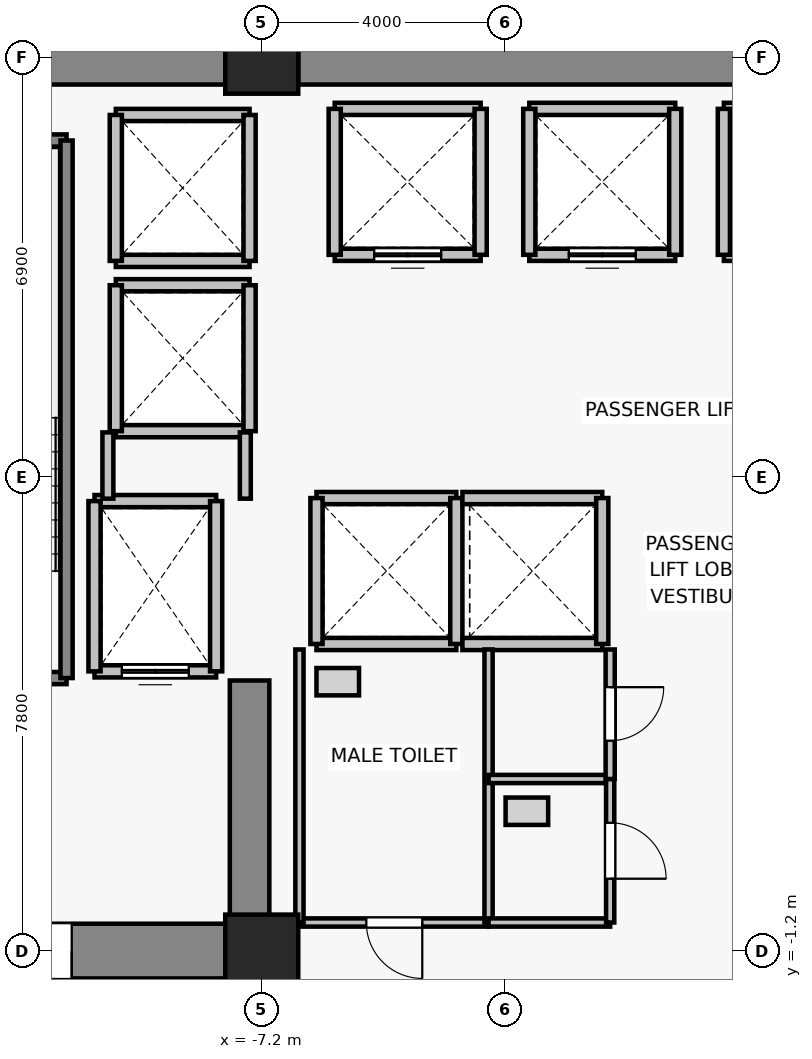
"""IFC4 building model, lengths in metres.
Left out: names, types, materials, properties, quantities, classifications, styles, units other than length and angle.
Written with IfcOpenShell. Run it as: python <this file> out.ifc"""

import sys

from ifc_helpers import new_model, si_unit, direction, frame, frame_2d, origin, origin_2d, place, context, subcontext, project, spatial, rectangle, extrude, source, transform, mapped, element, fill, save


model = new_model("IFC4")
c1 = context("Model", 3, precision=1e-05, world=origin(), true_north=direction((0.0, 1.0)))
c2 = subcontext(c1, "Body", "Model", "MODEL_VIEW")
j1 = project(units=[si_unit("LENGTHUNIT", "METRE"), si_unit("PLANEANGLEUNIT", "RADIAN")], contexts=[c1])
p1 = place(None, origin())
s1 = spatial("IfcSite", under=j1, at=p1, CompositionType="ELEMENT")
p2 = place(p1, origin())
s2 = spatial("IfcBuilding", under=s1, at=p2, CompositionType="ELEMENT")
p3 = place(p2, frame((0.0, 0.0, 43.9)))
s3 = spatial("IfcBuildingStorey", under=s2, at=p3, CompositionType="ELEMENT", Elevation=43.9)
for number, where, z_axis, x_axis in (
    (1, (-7.2, -1.2, 0.0), (0.0, 0.0, 1.0), (1.0, 0.0, 0.0)),
    (2, (-7.2, 13.5, 0.0), (0.0, 0.0, 1.0), (1.0, 0.0, 0.0)),
):
    element("IfcColumn", number, at=place(p3, frame(where, z_axis=z_axis, x_axis=x_axis)), inside=s3, PredefinedType="COLUMN", context=c2, shape_type="SweptSolid", body=[
        extrude(rectangle(XDim=1.2, YDim=1.2, at=origin_2d()), origin(), (0.0, 0.0, 1.0), 3.3),
    ])
p4 = place(p3, frame((-13.8, 13.5, 0.0), z_axis=(0.0, 0.0, 1.0), x_axis=(1.0, 0.0, 0.0)))
e3 = element("IfcWall", 3, at=p4, inside=s3, PredefinedType="SHEAR", context=c2, shape_type="SweptSolid", body=[
    extrude(rectangle(XDim=6.0, YDim=0.9, at=frame_2d((3.0, 0.0))), origin(), (0.0, 0.0, 1.0), 3.075),
])
p5 = place(p3, frame((-6.6, 13.5, 0.0), z_axis=(0.0, 0.0, 1.0), x_axis=(1.0, 0.0, 0.0)))
e4 = element("IfcWall", 4, at=p5, inside=s3, PredefinedType="SHEAR", context=c2, shape_type="SweptSolid", body=[
    extrude(rectangle(XDim=13.2, YDim=0.9, at=frame_2d((6.6, 0.0))), origin(), (0.0, 0.0, 1.0), 3.075),
])
p6 = place(p3, frame((-7.8, -1.2, 0.0), z_axis=(0.0, 0.0, 1.0), x_axis=(-1.0, 0.0, 0.0)))
e5 = element("IfcWall", 5, at=p6, inside=s3, PredefinedType="SHEAR", context=c2, shape_type="SweptSolid", body=[
    extrude(rectangle(XDim=6.0, YDim=0.9, at=frame_2d((3.0, 0.0))), origin(), (0.0, 0.0, 1.0), 3.075),
])
p7 = place(p6, frame((2.525, 0.0, 0.0)))
e6 = element("IfcOpeningElement", 6, at=p7, cuts=e5, PredefinedType="OPENING", context=c2, shape_type="SweptSolid", body=[
    extrude(rectangle(XDim=1.15, YDim=2.15, at=frame_2d((0.575, 1.075))), frame((0.0, 0.46, 0.0), z_axis=(0.0, -1.0, 0.0), x_axis=(1.0, 0.0, 0.0)), (0.0, 0.0, 1.0), 0.92),
])
p8 = place(p3, frame((-7.4, -0.75, 0.0), z_axis=(0.0, 0.0, 1.0), x_axis=(0.0, 1.0, 0.0)))
e7 = element("IfcWall", 7, at=p8, inside=s3, PredefinedType="SHEAR", context=c2, shape_type="SweptSolid", body=[
    extrude(rectangle(XDim=4.0, YDim=0.65, at=frame_2d((2.0, 0.0))), origin(), (0.0, 0.0, 1.0), 3.075),
])
p9 = place(p3, frame((-7.95, 3.4, 0.0), z_axis=(0.0, 0.0, 1.0), x_axis=(-1.0, 0.0, 0.0)))
e8 = element("IfcWall", 8, at=p9, inside=s3, PredefinedType="SOLIDWALL", context=c2, shape_type="SweptSolid", body=[
    extrude(rectangle(XDim=2.0, YDim=0.2, at=frame_2d((1.0, 0.0))), origin(), (0.0, 0.0, 1.0), 3.075),
])
p10 = place(p9, frame((0.45, 0.0, 0.0)))
e9 = element("IfcOpeningElement", 9, at=p10, cuts=e8, PredefinedType="OPENING", context=c2, shape_type="SweptSolid", body=[
    extrude(rectangle(XDim=1.1, YDim=2.2, at=frame_2d((0.55, 1.1))), frame((0.0, 0.11, 0.0), z_axis=(0.0, -1.0, 0.0), x_axis=(1.0, 0.0, 0.0)), (0.0, 0.0, 1.0), 0.22),
])
p11 = place(p3, frame((-9.95, 6.2, 0.0), z_axis=(0.0, 0.0, 1.0), x_axis=(1.0, 0.0, 0.0)))
e10 = element("IfcWall", 10, at=p11, inside=s3, PredefinedType="SOLIDWALL", context=c2, shape_type="SweptSolid", body=[
    extrude(rectangle(XDim=2.0, YDim=0.2, at=frame_2d((1.0, 0.0))), origin(), (0.0, 0.0, 1.0), 3.075),
])
for number, where, z_axis, x_axis in (
    (11, (-9.95, 3.4, 0.0), (0.0, 0.0, 1.0), (0.0, 1.0, 0.0)),
    (12, (-7.95, 6.2, 0.0), (0.0, 0.0, 1.0), (0.0, -1.0, 0.0)),
):
    element("IfcWall", number, at=place(p3, frame(where, z_axis=z_axis, x_axis=x_axis)), inside=s3, PredefinedType="SOLIDWALL", context=c2, shape_type="SweptSolid", body=[
        extrude(rectangle(XDim=2.8, YDim=0.2, at=frame_2d((1.4, 0.0))), origin(), (0.0, 0.0, 1.0), 3.075),
    ])
p12 = place(p3, frame((-3.6, 10.25, 0.0), z_axis=(0.0, 0.0, 1.0), x_axis=(-1.0, 0.0, 0.0)))
e13 = element("IfcWall", 13, at=p12, inside=s3, PredefinedType="SOLIDWALL", context=c2, shape_type="SweptSolid", body=[
    extrude(rectangle(XDim=2.4, YDim=0.2, at=frame_2d((1.2, 0.0))), origin(), (0.0, 0.0, 1.0), 3.075),
])
p13 = place(p12, frame((0.65, 0.0, 0.0)))
e14 = element("IfcOpeningElement", 14, at=p13, cuts=e13, PredefinedType="OPENING", context=c2, shape_type="SweptSolid", body=[
    extrude(rectangle(XDim=1.1, YDim=2.2, at=frame_2d((0.55, 1.1))), frame((0.0, 0.11, 0.0), z_axis=(0.0, -1.0, 0.0), x_axis=(1.0, 0.0, 0.0)), (0.0, 0.0, 1.0), 0.22),
])
for number, where, z_axis, x_axis in (
    (15, (-6.0, 12.65, 0.0), (0.0, 0.0, 1.0), (1.0, 0.0, 0.0)),
    (16, (-6.0, 10.25, 0.0), (0.0, 0.0, 1.0), (0.0, 1.0, 0.0)),
    (17, (-3.6, 12.65, 0.0), (0.0, 0.0, 1.0), (0.0, -1.0, 0.0)),
):
    element("IfcWall", number, at=place(p3, frame(where, z_axis=z_axis, x_axis=x_axis)), inside=s3, PredefinedType="SOLIDWALL", context=c2, shape_type="SweptSolid", body=[
        extrude(rectangle(XDim=2.4, YDim=0.2, at=frame_2d((1.2, 0.0))), origin(), (0.0, 0.0, 1.0), 3.075),
    ])
p14 = place(p3, frame((-0.4, 10.25, 0.0), z_axis=(0.0, 0.0, 1.0), x_axis=(-1.0, 0.0, 0.0)))
e18 = element("IfcWall", 18, at=p14, inside=s3, PredefinedType="SOLIDWALL", context=c2, shape_type="SweptSolid", body=[
    extrude(rectangle(XDim=2.4, YDim=0.2, at=frame_2d((1.2, 0.0))), origin(), (0.0, 0.0, 1.0), 3.075),
])
p15 = place(p14, frame((0.65, 0.0, 0.0)))
e19 = element("IfcOpeningElement", 19, at=p15, cuts=e18, PredefinedType="OPENING", context=c2, shape_type="SweptSolid", body=[
    extrude(rectangle(XDim=1.1, YDim=2.2, at=frame_2d((0.55, 1.1))), frame((0.0, 0.11, 0.0), z_axis=(0.0, -1.0, 0.0), x_axis=(1.0, 0.0, 0.0)), (0.0, 0.0, 1.0), 0.22),
])
p16 = place(p3, frame((-2.8, 12.65, 0.0), z_axis=(0.0, 0.0, 1.0), x_axis=(1.0, 0.0, 0.0)))
e20 = element("IfcWall", 20, at=p16, inside=s3, PredefinedType="SOLIDWALL", context=c2, shape_type="SweptSolid", body=[
    extrude(rectangle(XDim=2.4, YDim=0.2, at=frame_2d((1.2, 0.0))), origin(), (0.0, 0.0, 1.0), 3.075),
])
for number, where, z_axis, x_axis in (
    (21, (-2.8, 10.25, 0.0), (0.0, 0.0, 1.0), (0.0, 1.0, 0.0)),
    (22, (-0.4, 12.65, 0.0), (0.0, 0.0, 1.0), (0.0, -1.0, 0.0)),
):
    element("IfcWall", number, at=place(p3, frame(where, z_axis=z_axis, x_axis=x_axis)), inside=s3, PredefinedType="SOLIDWALL", context=c2, shape_type="SweptSolid", body=[
        extrude(rectangle(XDim=2.4, YDim=0.2, at=frame_2d((1.2, 0.0))), origin(), (0.0, 0.0, 1.0), 3.075),
    ])
p17 = place(p3, frame((2.8, 10.25, 0.0), z_axis=(0.0, 0.0, 1.0), x_axis=(-1.0, 0.0, 0.0)))
e23 = element("IfcWall", 23, at=p17, inside=s3, PredefinedType="SOLIDWALL", context=c2, shape_type="SweptSolid", body=[
    extrude(rectangle(XDim=2.4, YDim=0.2, at=frame_2d((1.2, 0.0))), origin(), (0.0, 0.0, 1.0), 3.075),
])
p18 = place(p17, frame((0.65, 0.0, 0.0)))
e24 = element("IfcOpeningElement", 24, at=p18, cuts=e23, PredefinedType="OPENING", context=c2, shape_type="SweptSolid", body=[
    extrude(rectangle(XDim=1.1, YDim=2.2, at=frame_2d((0.55, 1.1))), frame((0.0, 0.11, 0.0), z_axis=(0.0, -1.0, 0.0), x_axis=(1.0, 0.0, 0.0)), (0.0, 0.0, 1.0), 0.22),
])
p19 = place(p3, frame((0.4, 12.65, 0.0), z_axis=(0.0, 0.0, 1.0), x_axis=(1.0, 0.0, 0.0)))
e25 = element("IfcWall", 25, at=p19, inside=s3, PredefinedType="SOLIDWALL", context=c2, shape_type="SweptSolid", body=[
    extrude(rectangle(XDim=2.4, YDim=0.2, at=frame_2d((1.2, 0.0))), origin(), (0.0, 0.0, 1.0), 3.075),
])
p20 = place(p3, frame((0.4, 10.25, 0.0), z_axis=(0.0, 0.0, 1.0), x_axis=(0.0, 1.0, 0.0)))
e26 = element("IfcWall", 26, at=p20, inside=s3, PredefinedType="SOLIDWALL", context=c2, shape_type="SweptSolid", body=[
    extrude(rectangle(XDim=2.4, YDim=0.2, at=frame_2d((1.2, 0.0))), origin(), (0.0, 0.0, 1.0), 3.075),
])
for number, where, z_axis, x_axis in (
    (27, (-4.0, 3.85, 0.0), (0.0, 0.0, 1.0), (-1.0, 0.0, 0.0)),
    (28, (-6.3, 6.25, 0.0), (0.0, 0.0, 1.0), (1.0, 0.0, 0.0)),
):
    element("IfcWall", number, at=place(p3, frame(where, z_axis=z_axis, x_axis=x_axis)), inside=s3, PredefinedType="SOLIDWALL", context=c2, shape_type="SweptSolid", body=[
        extrude(rectangle(XDim=2.3, YDim=0.2, at=frame_2d((1.15, 0.0))), origin(), (0.0, 0.0, 1.0), 3.075),
    ])
for number, where, z_axis, x_axis in (
    (29, (-6.3, 3.85, 0.0), (0.0, 0.0, 1.0), (0.0, 1.0, 0.0)),
    (30, (-4.0, 6.25, 0.0), (0.0, 0.0, 1.0), (0.0, -1.0, 0.0)),
):
    element("IfcWall", number, at=place(p3, frame(where, z_axis=z_axis, x_axis=x_axis)), inside=s3, PredefinedType="SOLIDWALL", context=c2, shape_type="SweptSolid", body=[
        extrude(rectangle(XDim=2.4, YDim=0.2, at=frame_2d((1.2, 0.0))), origin(), (0.0, 0.0, 1.0), 3.075),
    ])
for number, where, z_axis, x_axis in (
    (31, (-1.6, 3.85, 0.0), (0.0, 0.0, 1.0), (-1.0, 0.0, 0.0)),
    (32, (-3.9, 6.25, 0.0), (0.0, 0.0, 1.0), (1.0, 0.0, 0.0)),
):
    element("IfcWall", number, at=place(p3, frame(where, z_axis=z_axis, x_axis=x_axis)), inside=s3, PredefinedType="SOLIDWALL", context=c2, shape_type="SweptSolid", body=[
        extrude(rectangle(XDim=2.3, YDim=0.2, at=frame_2d((1.15, 0.0))), origin(), (0.0, 0.0, 1.0), 3.075),
    ])
p21 = place(p3, frame((-1.6, 6.25, 0.0), z_axis=(0.0, 0.0, 1.0), x_axis=(0.0, -1.0, 0.0)))
e33 = element("IfcWall", 33, at=p21, inside=s3, PredefinedType="SOLIDWALL", context=c2, shape_type="SweptSolid", body=[
    extrude(rectangle(XDim=2.4, YDim=0.2, at=frame_2d((1.2, 0.0))), origin(), (0.0, 0.0, 1.0), 3.075),
])
for number, where, z_axis, x_axis in (
    (34, (-7.4, 7.35, 0.0), (0.0, 0.0, 1.0), (-1.0, 0.0, 0.0)),
    (35, (-9.6, 9.75, 0.0), (0.0, 0.0, 1.0), (1.0, 0.0, 0.0)),
):
    element("IfcWall", number, at=place(p3, frame(where, z_axis=z_axis, x_axis=x_axis)), inside=s3, PredefinedType="SOLIDWALL", context=c2, shape_type="SweptSolid", body=[
        extrude(rectangle(XDim=2.2, YDim=0.2, at=frame_2d((1.1, 0.0))), origin(), (0.0, 0.0, 1.0), 2.465),
    ])
p22 = place(p3, frame((-9.6, 7.35, 0.0), z_axis=(0.0, 0.0, 1.0), x_axis=(0.0, 1.0, 0.0)))
e36 = element("IfcWall", 36, at=p22, inside=s3, PredefinedType="SOLIDWALL", context=c2, shape_type="SweptSolid", body=[
    extrude(rectangle(XDim=2.4, YDim=0.2, at=frame_2d((1.2, 0.0))), origin(), (0.0, 0.0, 1.0), 3.075),
])
p23 = place(p3, frame((-7.4, 9.75, 0.0), z_axis=(0.0, 0.0, 1.0), x_axis=(0.0, -1.0, 0.0)))
e37 = element("IfcWall", 37, at=p23, inside=s3, PredefinedType="SOLIDWALL", context=c2, shape_type="SweptSolid", body=[
    extrude(rectangle(XDim=2.4, YDim=0.2, at=frame_2d((1.2, 0.0))), origin(), (0.0, 0.0, 1.0), 2.465),
])
for number, where, z_axis, x_axis in (
    (38, (-7.4, 10.15, 0.0), (0.0, 0.0, 1.0), (-1.0, 0.0, 0.0)),
    (39, (-9.6, 12.55, 0.0), (0.0, 0.0, 1.0), (1.0, 0.0, 0.0)),
):
    element("IfcWall", number, at=place(p3, frame(where, z_axis=z_axis, x_axis=x_axis)), inside=s3, PredefinedType="SOLIDWALL", context=c2, shape_type="SweptSolid", body=[
        extrude(rectangle(XDim=2.2, YDim=0.2, at=frame_2d((1.1, 0.0))), origin(), (0.0, 0.0, 1.0), 2.465),
    ])
p24 = place(p3, frame((-9.6, 10.15, 0.0), z_axis=(0.0, 0.0, 1.0), x_axis=(0.0, 1.0, 0.0)))
e40 = element("IfcWall", 40, at=p24, inside=s3, PredefinedType="SOLIDWALL", context=c2, shape_type="SweptSolid", body=[
    extrude(rectangle(XDim=2.4, YDim=0.2, at=frame_2d((1.2, 0.0))), origin(), (0.0, 0.0, 1.0), 3.075),
])
p25 = place(p3, frame((-7.4, 12.55, 0.0), z_axis=(0.0, 0.0, 1.0), x_axis=(0.0, -1.0, 0.0)))
e41 = element("IfcWall", 41, at=p25, inside=s3, PredefinedType="SOLIDWALL", context=c2, shape_type="SweptSolid", body=[
    extrude(rectangle(XDim=2.4, YDim=0.2, at=frame_2d((1.2, 0.0))), origin(), (0.0, 0.0, 1.0), 2.465),
])
p26 = place(p3, frame((-10.41, 3.29, 0.0), z_axis=(0.0, 0.0, 1.0), x_axis=(-1.0, 0.0, 0.0)))
e42 = element("IfcWall", 42, at=p26, inside=s3, PredefinedType="SOLIDWALL", context=c2, shape_type="SweptSolid", body=[
    extrude(rectangle(XDim=3.52, YDim=0.2, at=frame_2d((1.76, 0.0))), origin(), (0.0, 0.0, 1.0), 3.075),
])
p27 = place(p26, frame((1.165, 0.0, 0.0)))
e43 = element("IfcOpeningElement", 43, at=p27, cuts=e42, PredefinedType="OPENING", context=c2, shape_type="SweptSolid", body=[
    extrude(rectangle(XDim=1.15, YDim=2.15, at=frame_2d((0.575, 1.075))), frame((0.0, 0.11, 0.0), z_axis=(0.0, -1.0, 0.0), x_axis=(1.0, 0.0, 0.0)), (0.0, 0.0, 1.0), 0.22),
])
p28 = place(p3, frame((-13.93, 12.13, 0.0), z_axis=(0.0, 0.0, 1.0), x_axis=(1.0, 0.0, 0.0)))
e44 = element("IfcWall", 44, at=p28, inside=s3, PredefinedType="SOLIDWALL", context=c2, shape_type="SweptSolid", body=[
    extrude(rectangle(XDim=3.52, YDim=0.2, at=frame_2d((1.76, 0.0))), origin(), (0.0, 0.0, 1.0), 3.075),
])
p29 = place(p3, frame((-10.41, 12.13, 0.0), z_axis=(0.0, 0.0, 1.0), x_axis=(0.0, -1.0, 0.0)))
e45 = element("IfcWall", 45, at=p29, inside=s3, PredefinedType="SOLIDWALL", context=c2, shape_type="SweptSolid", body=[
    extrude(rectangle(XDim=8.84, YDim=0.2, at=frame_2d((4.42, 0.0))), origin(), (0.0, 0.0, 1.0), 3.075),
])
p30 = place(p3, frame((-9.73, 6.24, 0.0), z_axis=(0.0, 0.0, 1.0), x_axis=(0.0, 1.0, 0.0)))
e46 = element("IfcWall", 46, at=p30, inside=s3, PredefinedType="PARTITIONING", context=c2, shape_type="SweptSolid", body=[
    extrude(rectangle(XDim=1.09, YDim=0.18, at=frame_2d((0.545, 0.0))), origin(), (0.0, 0.0, 1.0), 3.075),
])
p31 = place(p3, frame((-7.47, 7.33, 0.0), z_axis=(0.0, 0.0, 1.0), x_axis=(0.0, -1.0, 0.0)))
e47 = element("IfcWall", 47, at=p31, inside=s3, PredefinedType="PARTITIONING", context=c2, shape_type="SweptSolid", body=[
    extrude(rectangle(XDim=1.09, YDim=0.18, at=frame_2d((0.545, 0.0))), origin(), (0.0, 0.0, 1.0), 2.465),
])
p32 = place(p3, frame((-3.47, -0.73, 0.0), z_axis=(0.0, 0.0, 1.0), x_axis=(-1.0, 0.0, 0.0)))
e48 = element("IfcWall", 48, at=p32, inside=s3, PredefinedType="PARTITIONING", context=c2, shape_type="SweptSolid", body=[
    extrude(rectangle(XDim=3.11, YDim=0.135, at=frame_2d((1.555, 0.0))), origin(), (0.0, 0.0, 1.0), 3.075),
])
p33 = place(p32, frame((1.09, 0.0, 0.0)))
e49 = element("IfcOpeningElement", 49, at=p33, cuts=e48, PredefinedType="OPENING", context=c2, shape_type="SweptSolid", body=[
    extrude(rectangle(XDim=0.92, YDim=2.1, at=frame_2d((0.46, 1.05))), frame((0.0, 0.077, 0.0), z_axis=(0.0, -1.0, 0.0), x_axis=(1.0, 0.0, 0.0)), (0.0, 0.0, 1.0), 0.155),
])
for number, where, z_axis, x_axis in (
    (50, (-6.58, -0.73, 0.0), (0.0, 0.0, 1.0), (0.0, 1.0, 0.0)),
    (51, (-3.47, 3.76, 0.0), (0.0, 0.0, 1.0), (0.0, -1.0, 0.0)),
):
    element("IfcWall", number, at=place(p3, frame(where, z_axis=z_axis, x_axis=x_axis)), inside=s3, PredefinedType="PARTITIONING", context=c2, shape_type="SweptSolid", body=[
        extrude(rectangle(XDim=4.49, YDim=0.135, at=frame_2d((2.245, 0.0))), origin(), (0.0, 0.0, 1.0), 3.075),
    ])
for number, where, z_axis, x_axis in (
    (52, (-1.47, -0.73, 0.0), (0.0, 0.0, 1.0), (-1.0, 0.0, 0.0)),
    (53, (-3.47, 1.63, 0.0), (0.0, 0.0, 1.0), (1.0, 0.0, 0.0)),
):
    element("IfcWall", number, at=place(p3, frame(where, z_axis=z_axis, x_axis=x_axis)), inside=s3, PredefinedType="PARTITIONING", context=c2, shape_type="SweptSolid", body=[
        extrude(rectangle(XDim=2.0, YDim=0.135, at=frame_2d((1.0, 0.0))), origin(), (0.0, 0.0, 1.0), 3.075),
    ])
p34 = place(p3, frame((-1.47, 1.63, 0.0), z_axis=(0.0, 0.0, 1.0), x_axis=(0.0, -1.0, 0.0)))
e54 = element("IfcWall", 54, at=p34, inside=s3, PredefinedType="PARTITIONING", context=c2, shape_type="SweptSolid", body=[
    extrude(rectangle(XDim=2.36, YDim=0.135, at=frame_2d((1.18, 0.0))), origin(), (0.0, 0.0, 1.0), 3.075),
])
p35 = place(p34, frame((0.72, 0.0, 0.0)))
e55 = element("IfcOpeningElement", 55, at=p35, cuts=e54, PredefinedType="OPENING", context=c2, shape_type="SweptSolid", body=[
    extrude(rectangle(XDim=0.92, YDim=2.1, at=frame_2d((0.46, 1.05))), frame((0.0, 0.077, 0.0), z_axis=(0.0, -1.0, 0.0), x_axis=(1.0, 0.0, 0.0)), (0.0, 0.0, 1.0), 0.155),
])
p36 = place(p3, frame((-1.47, 3.76, 0.0), z_axis=(0.0, 0.0, 1.0), x_axis=(0.0, -1.0, 0.0)))
e56 = element("IfcWall", 56, at=p36, inside=s3, PredefinedType="PARTITIONING", context=c2, shape_type="SweptSolid", body=[
    extrude(rectangle(XDim=2.13, YDim=0.15, at=frame_2d((1.065, 0.0))), origin(), (0.0, 0.0, 1.0), 3.075),
])
p37 = place(p36, frame((0.62, 0.0, 0.0)))
e57 = element("IfcOpeningElement", 57, at=p37, cuts=e56, PredefinedType="OPENING", context=c2, shape_type="SweptSolid", body=[
    extrude(rectangle(XDim=0.88, YDim=2.1, at=frame_2d((0.44, 1.05))), frame((0.0, 0.085, 0.0), z_axis=(0.0, -1.0, 0.0), x_axis=(1.0, 0.0, 0.0)), (0.0, 0.0, 1.0), 0.17),
])
m1 = source(origin(), c2, "Body", "SweptSolid", [
    extrude(rectangle(XDim=1.1, YDim=2.2, at=frame_2d((0.55, 1.1))), frame((0.0, 0.025, 0.0), z_axis=(0.0, -1.0, 0.0), x_axis=(1.0, 0.0, 0.0)), (0.0, 0.0, 1.0), 0.05),
])
p38 = place(p10, origin())
e58 = element("IfcDoor", 58, at=p38, inside=s3, OperationType="DOUBLE_DOOR_SLIDING", PredefinedType="DOOR", context=c2, shape_type="MappedRepresentation", body=[
    mapped(m1, transform((0.0, 0.0, 0.0), x_axis=(1.0, 0.0, 0.0), y_axis=(0.0, 1.0, 0.0), z_axis=(0.0, 0.0, 1.0), scale=1.0)),
])
fill(e9, e58)
p39 = place(p13, origin())
e59 = element("IfcDoor", 59, at=p39, inside=s3, OperationType="DOUBLE_DOOR_SLIDING", PredefinedType="DOOR", context=c2, shape_type="MappedRepresentation", body=[
    mapped(m1, transform((0.0, 0.0, 0.0), x_axis=(1.0, 0.0, 0.0), y_axis=(0.0, 1.0, 0.0), z_axis=(0.0, 0.0, 1.0), scale=1.0)),
])
fill(e14, e59)
p40 = place(p15, origin())
e60 = element("IfcDoor", 60, at=p40, inside=s3, OperationType="DOUBLE_DOOR_SLIDING", PredefinedType="DOOR", context=c2, shape_type="MappedRepresentation", body=[
    mapped(m1, transform((0.0, 0.0, 0.0), x_axis=(1.0, 0.0, 0.0), y_axis=(0.0, 1.0, 0.0), z_axis=(0.0, 0.0, 1.0), scale=1.0)),
])
fill(e19, e60)
m2 = source(origin(), c2, "Body", "SweptSolid", [
    extrude(rectangle(XDim=1.15, YDim=2.15, at=frame_2d((0.575, 1.075))), frame((0.0, 0.025, 0.0), z_axis=(0.0, -1.0, 0.0), x_axis=(1.0, 0.0, 0.0)), (0.0, 0.0, 1.0), 0.05),
])
p41 = place(p7, origin())
e61 = element("IfcDoor", 61, at=p41, inside=s3, OperationType="SINGLE_SWING_LEFT", PredefinedType="DOOR", context=c2, shape_type="MappedRepresentation", body=[
    mapped(m2, transform((0.0, 0.0, 0.0), x_axis=(1.0, 0.0, 0.0), y_axis=(0.0, 1.0, 0.0), z_axis=(0.0, 0.0, 1.0), scale=1.0)),
])
fill(e6, e61)
m3 = source(origin(), c2, "Body", "SweptSolid", [
    extrude(rectangle(XDim=0.92, YDim=2.1, at=frame_2d((0.46, 1.05))), frame((0.0, 0.025, 0.0), z_axis=(0.0, -1.0, 0.0), x_axis=(1.0, 0.0, 0.0)), (0.0, 0.0, 1.0), 0.05),
])
p42 = place(p33, origin())
e62 = element("IfcDoor", 62, at=p42, inside=s3, OperationType="SINGLE_SWING_LEFT", PredefinedType="DOOR", context=c2, shape_type="MappedRepresentation", body=[
    mapped(m3, transform((0.0, 0.0, 0.0), x_axis=(1.0, 0.0, 0.0), y_axis=(0.0, 1.0, 0.0), z_axis=(0.0, 0.0, 1.0), scale=1.0)),
])
fill(e49, e62)
p43 = place(p35, origin())
e63 = element("IfcDoor", 63, at=p43, inside=s3, OperationType="SINGLE_SWING_RIGHT", PredefinedType="DOOR", context=c2, shape_type="MappedRepresentation", body=[
    mapped(m3, transform((0.0, 0.0, 0.0), x_axis=(1.0, 0.0, 0.0), y_axis=(0.0, 1.0, 0.0), z_axis=(0.0, 0.0, 1.0), scale=1.0)),
])
fill(e55, e63)
m4 = source(origin(), c2, "Body", "SweptSolid", [
    extrude(rectangle(XDim=0.88, YDim=2.1, at=frame_2d((0.44, 1.05))), frame((0.0, 0.025, 0.0), z_axis=(0.0, -1.0, 0.0), x_axis=(1.0, 0.0, 0.0)), (0.0, 0.0, 1.0), 0.05),
])
p44 = place(p37, origin())
e64 = element("IfcDoor", 64, at=p44, inside=s3, OperationType="SINGLE_SWING_LEFT", PredefinedType="DOOR", context=c2, shape_type="MappedRepresentation", body=[
    mapped(m4, transform((0.0, 0.0, 0.0), x_axis=(1.0, 0.0, 0.0), y_axis=(0.0, 1.0, 0.0), z_axis=(0.0, 0.0, 1.0), scale=1.0)),
])
fill(e57, e64)
save(model, sys.argv[1])
